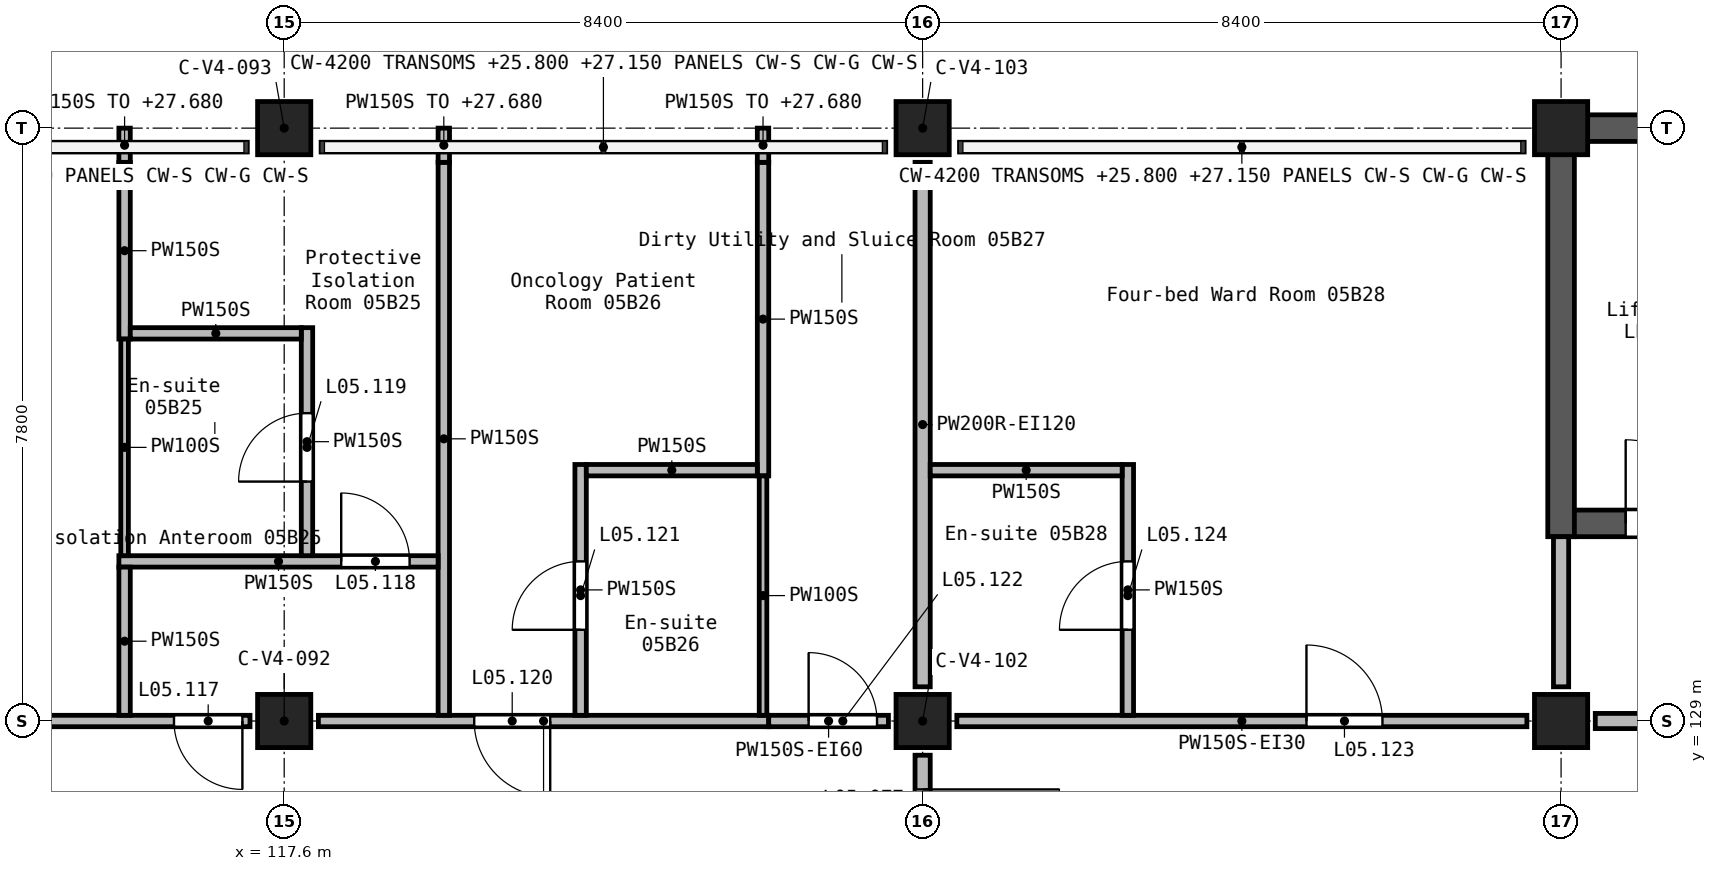
"""IFC4 building model, lengths in metres.
Left out: names, types, materials, properties, quantities, classifications, styles, units other than length and angle.
Written with IfcOpenShell. Run it as: python <this file> out.ifc"""

import sys

from ifc_helpers import new_model, si_unit, direction, frame, frame_2d, origin, origin_2d, place, context, subcontext, project, spatial, rectangle, extrude, element, fill, save


model = new_model("IFC4")
c1 = context("Model", 3, precision=1e-05, world=origin(), true_north=direction((0.0, 1.0)))
c2 = subcontext(c1, "Body", "Model", "MODEL_VIEW")
j1 = project(units=[si_unit("LENGTHUNIT", "METRE"), si_unit("PLANEANGLEUNIT", "RADIAN")], contexts=[c1])
p1 = place(None, origin())
s1 = spatial("IfcSite", under=j1, at=p1, CompositionType="ELEMENT")
p2 = place(p1, origin())
s2 = spatial("IfcBuilding", under=s1, at=p2, CompositionType="ELEMENT")
p3 = place(p2, frame((0.0, 0.0, 24.9)))
s3 = spatial("IfcBuildingStorey", under=s2, at=p3, CompositionType="ELEMENT", Elevation=24.9)
for number, where, z_axis, x_axis in (
    (1, (117.6, 129.0, 0.0), (0.0, 0.0, 1.0), (1.0, 0.0, 0.0)),
    (2, (117.6, 136.8, 0.0), (0.0, 0.0, 1.0), (1.0, 0.0, 0.0)),
    (3, (126.0, 129.0, 0.0), (0.0, 0.0, 1.0), (1.0, 0.0, 0.0)),
    (4, (126.0, 136.8, 0.0), (0.0, 0.0, 1.0), (1.0, 0.0, 0.0)),
    (5, (134.4, 129.0, 0.0), (0.0, 0.0, 1.0), (1.0, 0.0, 0.0)),
    (6, (134.4, 136.8, 0.0), (0.0, 0.0, 1.0), (1.0, 0.0, 0.0)),
):
    element("IfcColumn", number, at=place(p3, frame(where, z_axis=z_axis, x_axis=x_axis)), inside=s3, PredefinedType="COLUMN", context=c2, shape_type="SweptSolid", body=[
        extrude(rectangle(XDim=0.7, YDim=0.7, at=origin_2d()), origin(), (0.0, 0.0, 1.0), 3.9),
    ])
p4 = place(p3, frame((134.225, 136.8, 0.0), z_axis=(0.0, 0.0, 1.0), x_axis=(1.0, 0.0, 0.0)))
e7 = element("IfcWall", 7, at=p4, inside=s3, PredefinedType="SHEAR", context=c2, shape_type="SweptSolid", body=[
    extrude(rectangle(XDim=2.975, YDim=0.35, at=frame_2d((1.487, 0.0))), origin(), (0.0, 0.0, 1.0), 3.9),
])
p5 = place(p3, frame((134.4, 131.425, 0.0), z_axis=(0.0, 0.0, 1.0), x_axis=(0.0, 1.0, 0.0)))
e8 = element("IfcWall", 8, at=p5, inside=s3, PredefinedType="SHEAR", context=c2, shape_type="SweptSolid", body=[
    extrude(rectangle(XDim=5.2, YDim=0.35, at=frame_2d((2.6, 0.0))), origin(), (0.0, 0.0, 1.0), 3.9),
])
p6 = place(p3, frame((134.575, 131.6, 0.0), z_axis=(0.0, 0.0, 1.0), x_axis=(1.0, 0.0, 0.0)))
e9 = element("IfcWall", 9, at=p6, inside=s3, PredefinedType="SHEAR", context=c2, shape_type="SweptSolid", body=[
    extrude(rectangle(XDim=2.625, YDim=0.35, at=frame_2d((1.312, 0.0))), origin(), (0.0, 0.0, 1.0), 3.9),
])
p7 = place(p6, frame((0.675, 0.0, 0.0)))
e10 = element("IfcOpeningElement", 10, at=p7, cuts=e9, PredefinedType="OPENING", context=c2, shape_type="SweptSolid", body=[
    extrude(rectangle(XDim=1.1, YDim=2.1, at=frame_2d((0.55, 1.05))), frame((0.0, 0.185, 0.0), z_axis=(0.0, -1.0, 0.0), x_axis=(1.0, 0.0, 0.0)), (0.0, 0.0, 1.0), 0.37),
])
p8 = place(p3, frame((126.0, 136.35, 0.0), z_axis=(0.0, 0.0, 1.0), x_axis=(0.0, -1.0, 0.0)))
e11 = element("IfcWall", 11, at=p8, inside=s3, PredefinedType="SOLIDWALL", context=c2, shape_type="SweptSolid", body=[
    extrude(rectangle(XDim=6.9, YDim=0.2, at=frame_2d((3.45, 0.0))), origin(), (0.0, 0.0, 1.0), 3.6),
])
p9 = place(p3, frame((126.0, 128.55, 0.0), z_axis=(0.0, 0.0, 1.0), x_axis=(0.0, -1.0, 0.0)))
e12 = element("IfcWall", 12, at=p9, inside=s3, PredefinedType="SOLIDWALL", context=c2, shape_type="SweptSolid", body=[
    extrude(rectangle(XDim=2.7, YDim=0.2, at=frame_2d((1.35, 0.0))), origin(), (0.0, 0.0, 1.0), 3.6),
])
p10 = place(p9, frame((0.45, 0.0, 0.0)))
e13 = element("IfcOpeningElement", 13, at=p10, cuts=e12, PredefinedType="OPENING", context=c2, shape_type="SweptSolid", body=[
    extrude(rectangle(XDim=1.8, YDim=2.1, at=frame_2d((0.9, 1.05))), frame((0.0, 0.11, 0.0), z_axis=(0.0, -1.0, 0.0), x_axis=(1.0, 0.0, 0.0)), (0.0, 0.0, 1.0), 0.22),
])
p11 = place(p3, frame((134.85, 129.0, 0.0), z_axis=(0.0, 0.0, 1.0), x_axis=(1.0, 0.0, 0.0)))
e14 = element("IfcWall", 14, at=p11, inside=s3, PredefinedType="SOLIDWALL", context=c2, shape_type="SweptSolid", body=[
    extrude(rectangle(XDim=7.5, YDim=0.2, at=frame_2d((3.75, 0.0))), origin(), (0.0, 0.0, 1.0), 3.6),
])
p12 = place(p11, frame((2.85, 0.0, 0.0)))
e15 = element("IfcOpeningElement", 15, at=p12, cuts=e14, PredefinedType="OPENING", context=c2, shape_type="SweptSolid", body=[
    extrude(rectangle(XDim=1.8, YDim=2.1, at=frame_2d((0.9, 1.05))), frame((0.0, 0.11, 0.0), z_axis=(0.0, -1.0, 0.0), x_axis=(1.0, 0.0, 0.0)), (0.0, 0.0, 1.0), 0.22),
])
p13 = place(p3, frame((134.4, 129.45, 0.0), z_axis=(0.0, 0.0, 1.0), x_axis=(0.0, 1.0, 0.0)))
e16 = element("IfcWall", 16, at=p13, inside=s3, PredefinedType="SOLIDWALL", context=c2, shape_type="SweptSolid", body=[
    extrude(rectangle(XDim=1.975, YDim=0.2, at=frame_2d((0.988, 0.0))), origin(), (0.0, 0.0, 1.0), 3.6),
])
p14 = place(p3, frame((123.975, 129.0, 0.0), z_axis=(0.0, 0.0, 1.0), x_axis=(-1.0, 0.0, 0.0)))
e17 = element("IfcWall", 17, at=p14, inside=s3, PredefinedType="PARTITIONING", context=c2, shape_type="SweptSolid", body=[
    extrude(rectangle(XDim=5.925, YDim=0.15, at=frame_2d((2.962, 0.0))), origin(), (0.0, 0.0, 1.0), 3.6),
])
p15 = place(p14, frame((2.875, 0.0, 0.0)))
e18 = element("IfcOpeningElement", 18, at=p15, cuts=e17, PredefinedType="OPENING", context=c2, shape_type="SweptSolid", body=[
    extrude(rectangle(XDim=1.0, YDim=2.1, at=frame_2d((0.5, 1.05))), frame((0.0, 0.085, 0.0), z_axis=(0.0, -1.0, 0.0), x_axis=(1.0, 0.0, 0.0)), (0.0, 0.0, 1.0), 0.17),
])
p16 = place(p3, frame((117.15, 129.0, 0.0), z_axis=(0.0, 0.0, 1.0), x_axis=(-1.0, 0.0, 0.0)))
e19 = element("IfcWall", 19, at=p16, inside=s3, PredefinedType="PARTITIONING", context=c2, shape_type="SweptSolid", body=[
    extrude(rectangle(XDim=7.5, YDim=0.15, at=frame_2d((3.75, 0.0))), origin(), (0.0, 0.0, 1.0), 3.6),
])
p17 = place(p16, frame((3.9, 0.0, 0.0)))
e20 = element("IfcOpeningElement", 20, at=p17, cuts=e19, PredefinedType="OPENING", context=c2, shape_type="SweptSolid", body=[
    extrude(rectangle(XDim=1.8, YDim=2.1, at=frame_2d((0.9, 1.05))), frame((0.0, 0.085, 0.0), z_axis=(0.0, -1.0, 0.0), x_axis=(1.0, 0.0, 0.0)), (0.0, 0.0, 1.0), 0.17),
])
p18 = place(p16, frame((0.1, 0.0, 0.0)))
e21 = element("IfcOpeningElement", 21, at=p18, cuts=e19, PredefinedType="OPENING", context=c2, shape_type="SweptSolid", body=[
    extrude(rectangle(XDim=0.9, YDim=2.1, at=frame_2d((0.45, 1.05))), frame((0.0, 0.085, 0.0), z_axis=(0.0, -1.0, 0.0), x_axis=(1.0, 0.0, 0.0)), (0.0, 0.0, 1.0), 0.17),
])
p19 = place(p3, frame((126.45, 129.0, 0.0), z_axis=(0.0, 0.0, 1.0), x_axis=(1.0, 0.0, 0.0)))
e22 = element("IfcWall", 22, at=p19, inside=s3, PredefinedType="PARTITIONING", context=c2, shape_type="SweptSolid", body=[
    extrude(rectangle(XDim=7.5, YDim=0.15, at=frame_2d((3.75, 0.0))), origin(), (0.0, 0.0, 1.0), 3.6),
])
p20 = place(p19, frame((4.6, 0.0, 0.0)))
e23 = element("IfcOpeningElement", 23, at=p20, cuts=e22, PredefinedType="OPENING", context=c2, shape_type="SweptSolid", body=[
    extrude(rectangle(XDim=1.0, YDim=2.1, at=frame_2d((0.5, 1.05))), frame((0.0, 0.085, 0.0), z_axis=(0.0, -1.0, 0.0), x_axis=(1.0, 0.0, 0.0)), (0.0, 0.0, 1.0), 0.17),
])
p21 = place(p3, frame((123.975, 129.0, 0.0), z_axis=(0.0, 0.0, 1.0), x_axis=(1.0, 0.0, 0.0)))
e24 = element("IfcWall", 24, at=p21, inside=s3, PredefinedType="PARTITIONING", context=c2, shape_type="SweptSolid", body=[
    extrude(rectangle(XDim=1.575, YDim=0.15, at=frame_2d((0.788, 0.0))), origin(), (0.0, 0.0, 1.0), 3.6),
])
p22 = place(p21, frame((0.525, 0.0, 0.0)))
e25 = element("IfcOpeningElement", 25, at=p22, cuts=e24, PredefinedType="OPENING", context=c2, shape_type="SweptSolid", body=[
    extrude(rectangle(XDim=0.9, YDim=2.1, at=frame_2d((0.45, 1.05))), frame((0.0, 0.085, 0.0), z_axis=(0.0, -1.0, 0.0), x_axis=(1.0, 0.0, 0.0)), (0.0, 0.0, 1.0), 0.17),
])
p23 = place(p3, frame((119.7, 129.075, 0.0), z_axis=(0.0, 0.0, 1.0), x_axis=(0.0, 1.0, 0.0)))
e26 = element("IfcWall", 26, at=p23, inside=s3, PredefinedType="PARTITIONING", context=c2, shape_type="SweptSolid", body=[
    extrude(rectangle(XDim=7.275, YDim=0.15, at=frame_2d((3.638, 0.0))), origin(), (0.0, 0.0, 1.0), 3.6),
])
p24 = place(p3, frame((119.7, 136.35, 0.0), z_axis=(0.0, 0.0, 1.0), x_axis=(0.0, 1.0, 0.0)))
e27 = element("IfcWall", 27, at=p24, inside=s3, PredefinedType="PARTITIONING", context=c2, shape_type="SweptSolid", body=[
    extrude(rectangle(XDim=0.45, YDim=0.15, at=frame_2d((0.225, 0.0))), origin(), (0.0, 0.0, 1.0), 2.78),
])
p25 = place(p3, frame((123.9, 132.225, 0.0), z_axis=(0.0, 0.0, 1.0), x_axis=(0.0, 1.0, 0.0)))
e28 = element("IfcWall", 28, at=p25, inside=s3, PredefinedType="PARTITIONING", context=c2, shape_type="SweptSolid", body=[
    extrude(rectangle(XDim=4.125, YDim=0.15, at=frame_2d((2.062, 0.0))), origin(), (0.0, 0.0, 1.0), 3.6),
])
p26 = place(p3, frame((123.9, 136.35, 0.0), z_axis=(0.0, 0.0, 1.0), x_axis=(0.0, 1.0, 0.0)))
e29 = element("IfcWall", 29, at=p26, inside=s3, PredefinedType="PARTITIONING", context=c2, shape_type="SweptSolid", body=[
    extrude(rectangle(XDim=0.45, YDim=0.15, at=frame_2d((0.225, 0.0))), origin(), (0.0, 0.0, 1.0), 2.78),
])
p27 = place(p3, frame((115.425, 131.1, 0.0), z_axis=(0.0, 0.0, 1.0), x_axis=(1.0, 0.0, 0.0)))
e30 = element("IfcWall", 30, at=p27, inside=s3, PredefinedType="PARTITIONING", context=c2, shape_type="SweptSolid", body=[
    extrude(rectangle(XDim=4.2, YDim=0.15, at=frame_2d((2.1, 0.0))), origin(), (0.0, 0.0, 1.0), 3.6),
])
p28 = place(p27, frame((2.925, 0.0, 0.0)))
e31 = element("IfcOpeningElement", 31, at=p28, cuts=e30, PredefinedType="OPENING", context=c2, shape_type="SweptSolid", body=[
    extrude(rectangle(XDim=0.9, YDim=2.1, at=frame_2d((0.45, 1.05))), frame((0.0, 0.085, 0.0), z_axis=(0.0, -1.0, 0.0), x_axis=(1.0, 0.0, 0.0)), (0.0, 0.0, 1.0), 0.17),
])
p29 = place(p3, frame((121.5, 129.075, 0.0), z_axis=(0.0, 0.0, 1.0), x_axis=(0.0, 1.0, 0.0)))
e32 = element("IfcWall", 32, at=p29, inside=s3, PredefinedType="PARTITIONING", context=c2, shape_type="SweptSolid", body=[
    extrude(rectangle(XDim=3.3, YDim=0.15, at=frame_2d((1.65, 0.0))), origin(), (0.0, 0.0, 1.0), 3.6),
])
p30 = place(p29, frame((1.125, 0.0, 0.0)))
e33 = element("IfcOpeningElement", 33, at=p30, cuts=e32, PredefinedType="OPENING", context=c2, shape_type="SweptSolid", body=[
    extrude(rectangle(XDim=0.9, YDim=2.1, at=frame_2d((0.45, 1.05))), frame((0.0, 0.085, 0.0), z_axis=(0.0, -1.0, 0.0), x_axis=(1.0, 0.0, 0.0)), (0.0, 0.0, 1.0), 0.17),
])
p31 = place(p3, frame((128.7, 129.075, 0.0), z_axis=(0.0, 0.0, 1.0), x_axis=(0.0, 1.0, 0.0)))
e34 = element("IfcWall", 34, at=p31, inside=s3, PredefinedType="PARTITIONING", context=c2, shape_type="SweptSolid", body=[
    extrude(rectangle(XDim=3.3, YDim=0.15, at=frame_2d((1.65, 0.0))), origin(), (0.0, 0.0, 1.0), 3.6),
])
p32 = place(p31, frame((1.125, 0.0, 0.0)))
e35 = element("IfcOpeningElement", 35, at=p32, cuts=e34, PredefinedType="OPENING", context=c2, shape_type="SweptSolid", body=[
    extrude(rectangle(XDim=0.9, YDim=2.1, at=frame_2d((0.45, 1.05))), frame((0.0, 0.085, 0.0), z_axis=(0.0, -1.0, 0.0), x_axis=(1.0, 0.0, 0.0)), (0.0, 0.0, 1.0), 0.17),
])
p33 = place(p3, frame((117.9, 131.175, 0.0), z_axis=(0.0, 0.0, 1.0), x_axis=(0.0, 1.0, 0.0)))
e36 = element("IfcWall", 36, at=p33, inside=s3, PredefinedType="PARTITIONING", context=c2, shape_type="SweptSolid", body=[
    extrude(rectangle(XDim=3.0, YDim=0.15, at=frame_2d((1.5, 0.0))), origin(), (0.0, 0.0, 1.0), 3.6),
])
p34 = place(p33, frame((0.975, 0.0, 0.0)))
e37 = element("IfcOpeningElement", 37, at=p34, cuts=e36, PredefinedType="OPENING", context=c2, shape_type="SweptSolid", body=[
    extrude(rectangle(XDim=0.9, YDim=2.1, at=frame_2d((0.45, 1.05))), frame((0.0, 0.085, 0.0), z_axis=(0.0, -1.0, 0.0), x_axis=(1.0, 0.0, 0.0)), (0.0, 0.0, 1.0), 0.17),
])
p35 = place(p3, frame((115.5, 134.025, 0.0), z_axis=(0.0, 0.0, 1.0), x_axis=(0.0, 1.0, 0.0)))
e38 = element("IfcWall", 38, at=p35, inside=s3, PredefinedType="PARTITIONING", context=c2, shape_type="SweptSolid", body=[
    extrude(rectangle(XDim=2.325, YDim=0.15, at=frame_2d((1.163, 0.0))), origin(), (0.0, 0.0, 1.0), 3.6),
])
p36 = place(p3, frame((115.5, 136.35, 0.0), z_axis=(0.0, 0.0, 1.0), x_axis=(0.0, 1.0, 0.0)))
e39 = element("IfcWall", 39, at=p36, inside=s3, PredefinedType="PARTITIONING", context=c2, shape_type="SweptSolid", body=[
    extrude(rectangle(XDim=0.45, YDim=0.15, at=frame_2d((0.225, 0.0))), origin(), (0.0, 0.0, 1.0), 2.78),
])
p37 = place(p3, frame((126.1, 132.3, 0.0), z_axis=(0.0, 0.0, 1.0), x_axis=(1.0, 0.0, 0.0)))
e40 = element("IfcWall", 40, at=p37, inside=s3, PredefinedType="PARTITIONING", context=c2, shape_type="SweptSolid", body=[
    extrude(rectangle(XDim=2.525, YDim=0.15, at=frame_2d((1.262, 0.0))), origin(), (0.0, 0.0, 1.0), 3.6),
])
for number, where, z_axis, x_axis in (
    (41, (115.575, 134.1, 0.0), (0.0, 0.0, 1.0), (1.0, 0.0, 0.0)),
    (42, (121.575, 132.3, 0.0), (0.0, 0.0, 1.0), (1.0, 0.0, 0.0)),
):
    element("IfcWall", number, at=place(p3, frame(where, z_axis=z_axis, x_axis=x_axis)), inside=s3, PredefinedType="PARTITIONING", context=c2, shape_type="SweptSolid", body=[
        extrude(rectangle(XDim=2.25, YDim=0.15, at=frame_2d((1.125, 0.0))), origin(), (0.0, 0.0, 1.0), 3.6),
    ])
p38 = place(p3, frame((115.5, 129.075, 0.0), z_axis=(0.0, 0.0, 1.0), x_axis=(0.0, 1.0, 0.0)))
e43 = element("IfcWall", 43, at=p38, inside=s3, PredefinedType="PARTITIONING", context=c2, shape_type="SweptSolid", body=[
    extrude(rectangle(XDim=1.95, YDim=0.15, at=frame_2d((0.975, 0.0))), origin(), (0.0, 0.0, 1.0), 3.6),
])
p39 = place(p3, frame((123.9, 129.075, 0.0), z_axis=(0.0, 0.0, 1.0), x_axis=(0.0, 1.0, 0.0)))
e44 = element("IfcWall", 44, at=p39, inside=s3, PredefinedType="PARTITIONING", context=c2, shape_type="SweptSolid", body=[
    extrude(rectangle(XDim=3.15, YDim=0.1, at=frame_2d((1.575, 0.0))), origin(), (0.0, 0.0, 1.0), 3.6),
])
p40 = place(p3, frame((115.5, 131.175, 0.0), z_axis=(0.0, 0.0, 1.0), x_axis=(0.0, 1.0, 0.0)))
e45 = element("IfcWall", 45, at=p40, inside=s3, PredefinedType="PARTITIONING", context=c2, shape_type="SweptSolid", body=[
    extrude(rectangle(XDim=2.85, YDim=0.1, at=frame_2d((1.425, 0.0))), origin(), (0.0, 0.0, 1.0), 3.6),
])
p41 = place(p10, origin())
e46 = element("IfcDoor", 46, at=p41, inside=s3, OperationType="DOUBLE_DOOR_SINGLE_SWING", PredefinedType="DOOR", context=c2, shape_type="SweptSolid", body=[
    extrude(rectangle(XDim=1.8, YDim=2.1, at=frame_2d((0.9, 1.05))), frame((0.0, 0.025, 0.0), z_axis=(0.0, -1.0, 0.0), x_axis=(1.0, 0.0, 0.0)), (0.0, 0.0, 1.0), 0.05),
])
fill(e13, e46)
p42 = place(p18, frame((0.9, 0.0, 0.0), z_axis=(0.0, 0.0, 1.0), x_axis=(-1.0, 0.0, 0.0)))
e47 = element("IfcDoor", 47, at=p42, inside=s3, OperationType="SINGLE_SWING_RIGHT", PredefinedType="DOOR", context=c2, shape_type="SweptSolid", body=[
    extrude(rectangle(XDim=0.9, YDim=2.1, at=frame_2d((0.45, 1.05))), frame((0.0, 0.025, 0.0), z_axis=(0.0, -1.0, 0.0), x_axis=(1.0, 0.0, 0.0)), (0.0, 0.0, 1.0), 0.05),
])
fill(e21, e47)
p43 = place(p28, origin())
e48 = element("IfcDoor", 48, at=p43, inside=s3, OperationType="SINGLE_SWING_RIGHT", PredefinedType="DOOR", context=c2, shape_type="SweptSolid", body=[
    extrude(rectangle(XDim=0.9, YDim=2.1, at=frame_2d((0.45, 1.05))), frame((0.0, 0.025, 0.0), z_axis=(0.0, -1.0, 0.0), x_axis=(1.0, 0.0, 0.0)), (0.0, 0.0, 1.0), 0.05),
])
fill(e31, e48)
p44 = place(p34, origin())
e49 = element("IfcDoor", 49, at=p44, inside=s3, OperationType="SINGLE_SWING_LEFT", PredefinedType="DOOR", context=c2, shape_type="SweptSolid", body=[
    extrude(rectangle(XDim=0.9, YDim=2.1, at=frame_2d((0.45, 1.05))), frame((0.0, 0.025, 0.0), z_axis=(0.0, -1.0, 0.0), x_axis=(1.0, 0.0, 0.0)), (0.0, 0.0, 1.0), 0.05),
])
fill(e37, e49)
p45 = place(p15, frame((1.0, 0.0, 0.0), z_axis=(0.0, 0.0, 1.0), x_axis=(-1.0, 0.0, 0.0)))
e50 = element("IfcDoor", 50, at=p45, inside=s3, OperationType="SINGLE_SWING_LEFT", PredefinedType="DOOR", context=c2, shape_type="SweptSolid", body=[
    extrude(rectangle(XDim=1.0, YDim=2.1, at=frame_2d((0.5, 1.05))), frame((0.0, 0.025, 0.0), z_axis=(0.0, -1.0, 0.0), x_axis=(1.0, 0.0, 0.0)), (0.0, 0.0, 1.0), 0.05),
])
fill(e18, e50)
p46 = place(p30, frame((0.9, 0.0, 0.0), z_axis=(0.0, 0.0, 1.0), x_axis=(-1.0, 0.0, 0.0)))
e51 = element("IfcDoor", 51, at=p46, inside=s3, OperationType="SINGLE_SWING_RIGHT", PredefinedType="DOOR", context=c2, shape_type="SweptSolid", body=[
    extrude(rectangle(XDim=0.9, YDim=2.1, at=frame_2d((0.45, 1.05))), frame((0.0, 0.025, 0.0), z_axis=(0.0, -1.0, 0.0), x_axis=(1.0, 0.0, 0.0)), (0.0, 0.0, 1.0), 0.05),
])
fill(e33, e51)
p47 = place(p22, origin())
e52 = element("IfcDoor", 52, at=p47, inside=s3, OperationType="SINGLE_SWING_RIGHT", PredefinedType="DOOR", context=c2, shape_type="SweptSolid", body=[
    extrude(rectangle(XDim=0.9, YDim=2.1, at=frame_2d((0.45, 1.05))), frame((0.0, 0.025, 0.0), z_axis=(0.0, -1.0, 0.0), x_axis=(1.0, 0.0, 0.0)), (0.0, 0.0, 1.0), 0.05),
])
fill(e25, e52)
p48 = place(p20, origin())
e53 = element("IfcDoor", 53, at=p48, inside=s3, OperationType="SINGLE_SWING_RIGHT", PredefinedType="DOOR", context=c2, shape_type="SweptSolid", body=[
    extrude(rectangle(XDim=1.0, YDim=2.1, at=frame_2d((0.5, 1.05))), frame((0.0, 0.025, 0.0), z_axis=(0.0, -1.0, 0.0), x_axis=(1.0, 0.0, 0.0)), (0.0, 0.0, 1.0), 0.05),
])
fill(e23, e53)
p49 = place(p32, origin())
e54 = element("IfcDoor", 54, at=p49, inside=s3, OperationType="SINGLE_SWING_LEFT", PredefinedType="DOOR", context=c2, shape_type="SweptSolid", body=[
    extrude(rectangle(XDim=0.9, YDim=2.1, at=frame_2d((0.45, 1.05))), frame((0.0, 0.025, 0.0), z_axis=(0.0, -1.0, 0.0), x_axis=(1.0, 0.0, 0.0)), (0.0, 0.0, 1.0), 0.05),
])
fill(e35, e54)
p50 = place(p7, origin())
e55 = element("IfcDoor", 55, at=p50, inside=s3, OperationType="DOUBLE_DOOR_SLIDING", PredefinedType="DOOR", context=c2, shape_type="SweptSolid", body=[
    extrude(rectangle(XDim=1.1, YDim=2.1, at=frame_2d((0.55, 1.05))), frame((0.0, 0.025, 0.0), z_axis=(0.0, -1.0, 0.0), x_axis=(1.0, 0.0, 0.0)), (0.0, 0.0, 1.0), 0.05),
])
fill(e10, e55)
save(model, sys.argv[1])
